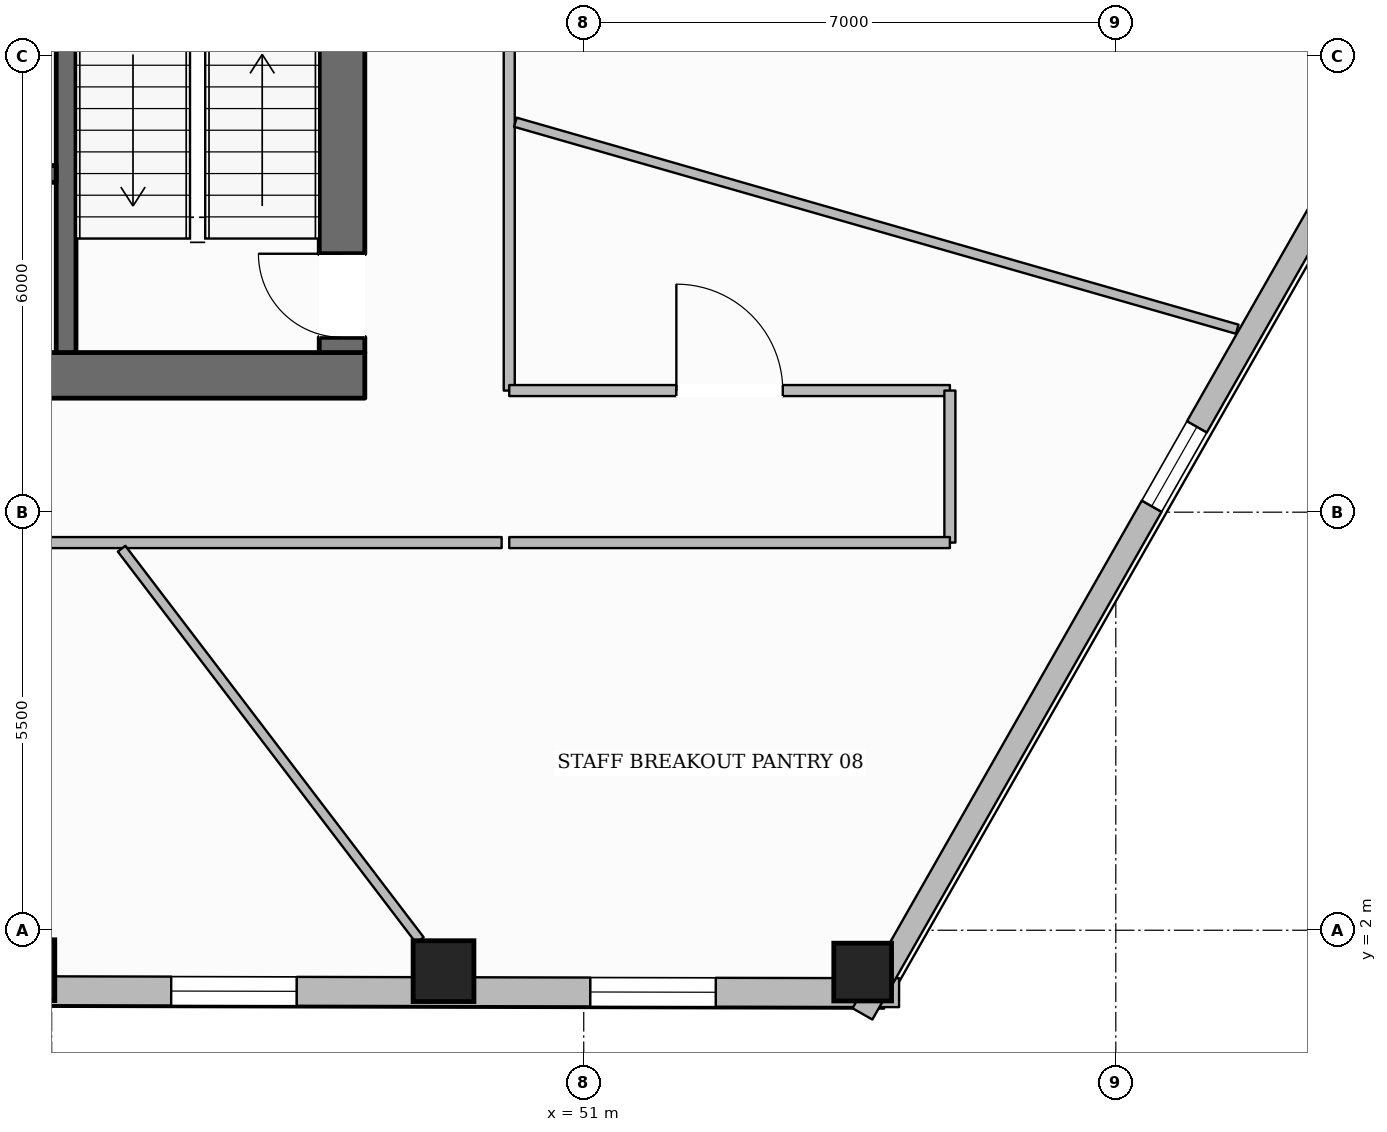
"""IFC4 building model, lengths in metres.
Left out: names, types, materials, properties, quantities, classifications, styles, units other than length and angle.
Written with IfcOpenShell. Run it as: python <this file> out.ifc"""

import sys

from ifc_helpers import new_model, si_unit, direction, frame, frame_2d, origin, origin_2d, place, context, subcontext, project, spatial, rectangle, hollow_rectangle, extrude, element, fill, save


model = new_model("IFC4")
c1 = context("Model", 3, precision=1e-05, world=origin(), true_north=direction((0.0, 1.0)))
c2 = subcontext(c1, "Body", "Model", "MODEL_VIEW")
j1 = project(units=[si_unit("LENGTHUNIT", "METRE"), si_unit("PLANEANGLEUNIT", "RADIAN")], contexts=[c1])
p1 = place(None, origin())
s1 = spatial("IfcSite", under=j1, at=p1, CompositionType="ELEMENT")
p2 = place(p1, origin())
s2 = spatial("IfcBuilding", under=s1, at=p2, CompositionType="ELEMENT")
p3 = place(p2, frame((0.0, 0.0, 32.95)))
s3 = spatial("IfcBuildingStorey", under=s2, at=p3, CompositionType="ELEMENT", Elevation=32.95)
p4 = place(p3, frame((27.88, 9.3, 0.0), z_axis=(0.0, 0.0, 1.0), x_axis=(1.0, 0.0, 0.0)))
e1 = element("IfcWall", 1, at=p4, inside=s3, PredefinedType="SOLIDWALL", context=c2, shape_type="SweptSolid", body=[
    extrude(rectangle(XDim=20.24, YDim=0.6, at=frame_2d((10.12, 0.0))), origin(), (0.0, 0.0, 1.0), 3.59),
])
p5 = place(p4, frame((10.62, 0.0, 0.0)))
e2 = element("IfcOpeningElement", 2, at=p5, cuts=e1, PredefinedType="OPENING", context=c2, shape_type="SweptSolid", body=[
    extrude(rectangle(XDim=1.4, YDim=2.2, at=frame_2d((0.7, 1.1))), frame((0.0, 0.31, 0.0), z_axis=(0.0, -1.0, 0.0), x_axis=(1.0, 0.0, 0.0)), (0.0, 0.0, 1.0), 0.62),
])
p6 = place(p3, frame((47.82, 9.6, 0.0), z_axis=(0.0, 0.0, 1.0), x_axis=(0.0, 1.0, 0.0)))
e3 = element("IfcWall", 3, at=p6, inside=s3, PredefinedType="SOLIDWALL", context=c2, shape_type="SweptSolid", body=[
    extrude(rectangle(XDim=13.0, YDim=0.6, at=frame_2d((6.5, 0.0))), origin(), (0.0, 0.0, 1.0), 3.59),
])
p7 = place(p6, frame((0.2, 0.0, 0.0)))
e4 = element("IfcOpeningElement", 4, at=p7, cuts=e3, PredefinedType="OPENING", context=c2, shape_type="SweptSolid", body=[
    extrude(rectangle(XDim=1.1, YDim=2.15, at=frame_2d((0.55, 1.075))), frame((0.0, 0.31, 0.0), z_axis=(0.0, -1.0, 0.0), x_axis=(1.0, 0.0, 0.0)), (0.0, 0.0, 1.0), 0.62),
])
p8 = place(p6, frame((8.4, 0.0, 0.0)))
e5 = element("IfcOpeningElement", 5, at=p8, cuts=e3, PredefinedType="OPENING", context=c2, shape_type="SweptSolid", body=[
    extrude(rectangle(XDim=0.9, YDim=2.1, at=frame_2d((0.45, 1.05))), frame((0.0, 0.31, 0.0), z_axis=(0.0, -1.0, 0.0), x_axis=(1.0, 0.0, 0.0)), (0.0, 0.0, 1.0), 0.62),
])
p9 = place(p3, frame((44.19, 9.6, 0.0), z_axis=(0.0, 0.0, 1.0), x_axis=(0.0, 1.0, 0.0)))
e6 = element("IfcWall", 6, at=p9, inside=s3, PredefinedType="SHEAR", context=c2, shape_type="SweptSolid", body=[
    extrude(rectangle(XDim=13.0, YDim=0.26, at=frame_2d((6.5, 0.0))), origin(), (0.0, 0.0, 1.0), 3.59),
])
p10 = place(p9, frame((10.925, 0.0, 0.0)))
e7 = element("IfcOpeningElement", 7, at=p10, cuts=e6, PredefinedType="OPENING", context=c2, shape_type="SweptSolid", body=[
    extrude(rectangle(XDim=1.25, YDim=2.25, at=frame_2d((0.625, 1.125))), frame((0.0, 0.14, 0.0), z_axis=(0.0, -1.0, 0.0), x_axis=(1.0, 0.0, 0.0)), (0.0, 0.0, 1.0), 0.28),
])
p11 = place(p3, frame((40.28, 11.95, 0.0), z_axis=(0.0, 0.0, 1.0), x_axis=(1.0, 0.0, 0.0)))
e8 = element("IfcWall", 8, at=p11, inside=s3, PredefinedType="SOLIDWALL", context=c2, shape_type="SweptSolid", body=[
    extrude(rectangle(XDim=3.78, YDim=0.22, at=frame_2d((1.89, 0.0))), origin(), (0.0, 0.0, 1.0), 3.59),
])
p12 = place(p11, frame((1.55, 0.0, 0.0)))
e9 = element("IfcOpeningElement", 9, at=p12, cuts=e8, PredefinedType="OPENING", context=c2, shape_type="SweptSolid", body=[
    extrude(rectangle(XDim=0.9, YDim=2.1, at=frame_2d((0.45, 1.05))), frame((0.0, 0.12, 0.0), z_axis=(0.0, -1.0, 0.0), x_axis=(1.0, 0.0, 0.0)), (0.0, 0.0, 1.0), 0.24),
])
for number, where, z_axis, x_axis in (
    (10, (43.641, 1.474, 0.0), (0.0, 0.0, 1.0), (1.0, 0.0, 0.0)),
    (11, (49.155, 1.462, 0.0), (0.0, 0.0, 1.0), (1.0, 0.0, 0.0)),
):
    element("IfcColumn", number, at=place(p3, frame(where, z_axis=z_axis, x_axis=x_axis)), inside=s3, PredefinedType="COLUMN", context=c2, shape_type="SweptSolid", body=[
        extrude(hollow_rectangle(XDim=0.8, YDim=0.8, WallThickness=0.036, at=origin_2d()), origin(), (0.0, 0.0, 1.0), 3.59),
    ])
p13 = place(p3, frame((54.67, 1.45, 0.0), z_axis=(0.0, 0.0, 1.0), x_axis=(1.0, 0.0, 0.0)))
e12 = element("IfcColumn", 12, at=p13, inside=s3, PredefinedType="COLUMN", context=c2, shape_type="SweptSolid", body=[
    extrude(hollow_rectangle(XDim=0.76, YDim=0.76, WallThickness=0.035, at=origin_2d()), origin(), (0.0, 0.0, 1.0), 3.59),
])
p14 = place(p3, frame((55.149, 1.179, 0.0), z_axis=(0.0, 0.0, 1.0), x_axis=(-0.999997528713, 0.002223188878, 0.0)))
e13 = element("IfcWall", 13, at=p14, inside=s3, PredefinedType="STANDARD", context=c2, shape_type="SweptSolid", body=[
    extrude(rectangle(XDim=34.043, YDim=0.38, at=frame_2d((17.021, 0.0))), origin(), (0.0, 0.0, 1.0), 2.97),
])
p15 = place(p14, frame((29.983, 0.0, 0.65)))
e14 = element("IfcOpeningElement", 14, at=p15, cuts=e13, PredefinedType="OPENING", context=c2, shape_type="SweptSolid", body=[
    extrude(rectangle(XDim=1.65, YDim=1.75, at=frame_2d((0.825, 0.875))), frame((0.0, 0.2, 0.0), z_axis=(0.0, -1.0, 0.0), x_axis=(1.0, 0.0, 0.0)), (0.0, 0.0, 1.0), 0.4),
])
p16 = place(p14, frame((24.469, 0.0, 0.65)))
e15 = element("IfcOpeningElement", 15, at=p16, cuts=e13, PredefinedType="OPENING", context=c2, shape_type="SweptSolid", body=[
    extrude(rectangle(XDim=1.65, YDim=1.75, at=frame_2d((0.825, 0.875))), frame((0.0, 0.2, 0.0), z_axis=(0.0, -1.0, 0.0), x_axis=(1.0, 0.0, 0.0)), (0.0, 0.0, 1.0), 0.4),
])
p17 = place(p14, frame((18.955, 0.0, 0.65)))
e16 = element("IfcOpeningElement", 16, at=p17, cuts=e13, PredefinedType="OPENING", context=c2, shape_type="SweptSolid", body=[
    extrude(rectangle(XDim=1.65, YDim=1.75, at=frame_2d((0.825, 0.875))), frame((0.0, 0.2, 0.0), z_axis=(0.0, -1.0, 0.0), x_axis=(1.0, 0.0, 0.0)), (0.0, 0.0, 1.0), 0.4),
])
p18 = place(p14, frame((7.926, 0.0, 0.65)))
e17 = element("IfcOpeningElement", 17, at=p18, cuts=e13, PredefinedType="OPENING", context=c2, shape_type="SweptSolid", body=[
    extrude(rectangle(XDim=1.65, YDim=1.75, at=frame_2d((0.825, 0.875))), frame((0.0, 0.2, 0.0), z_axis=(0.0, -1.0, 0.0), x_axis=(1.0, 0.0, 0.0)), (0.0, 0.0, 1.0), 0.4),
])
p19 = place(p14, frame((2.412, 0.0, 0.65)))
e18 = element("IfcOpeningElement", 18, at=p19, cuts=e13, PredefinedType="OPENING", context=c2, shape_type="SweptSolid", body=[
    extrude(rectangle(XDim=1.65, YDim=1.75, at=frame_2d((0.825, 0.875))), frame((0.0, 0.2, 0.0), z_axis=(0.0, -1.0, 0.0), x_axis=(1.0, 0.0, 0.0)), (0.0, 0.0, 1.0), 0.4),
])
p20 = place(p3, frame((62.872, 15.301, 0.0), z_axis=(0.0, 0.0, 1.0), x_axis=(-0.495028156912, -0.868876932519, 0.0)))
e19 = element("IfcWall", 19, at=p20, inside=s3, PredefinedType="STANDARD", context=c2, shape_type="SweptSolid", body=[
    extrude(rectangle(XDim=16.575, YDim=0.3, at=frame_2d((8.288, 0.0))), origin(), (0.0, 0.0, 1.0), 2.97),
])
p21 = place(p20, frame((7.688, 0.0, 0.65)))
e20 = element("IfcOpeningElement", 20, at=p21, cuts=e19, PredefinedType="OPENING", context=c2, shape_type="SweptSolid", body=[
    extrude(rectangle(XDim=1.2, YDim=1.7, at=frame_2d((0.6, 0.85))), frame((0.0, 0.16, 0.0), z_axis=(0.0, -1.0, 0.0), x_axis=(1.0, 0.0, 0.0)), (0.0, 0.0, 1.0), 0.32),
])
p22 = place(p3, frame((50.02, 25.1, 0.0), z_axis=(0.0, 0.0, 1.0), x_axis=(0.0, -1.0, 0.0)))
e21 = element("IfcWall", 21, at=p22, inside=s3, PredefinedType="PARTITIONING", context=c2, shape_type="SweptSolid", body=[
    extrude(rectangle(XDim=16.0, YDim=0.145, at=frame_2d((8.0, 0.0))), origin(), (0.0, 0.0, 1.0), 3.278),
])
p23 = place(p22, frame((2.834, 0.0, 0.0)))
e22 = element("IfcOpeningElement", 22, at=p23, cuts=e21, PredefinedType="OPENING", context=c2, shape_type="SweptSolid", body=[
    extrude(rectangle(XDim=1.4, YDim=2.2, at=frame_2d((0.7, 1.1))), frame((0.0, 0.083, 0.0), z_axis=(0.0, -1.0, 0.0), x_axis=(1.0, 0.0, 0.0)), (0.0, 0.0, 1.0), 0.165),
])
p24 = place(p22, frame((8.983, 0.0, 0.0)))
e23 = element("IfcOpeningElement", 23, at=p24, cuts=e21, PredefinedType="OPENING", context=c2, shape_type="SweptSolid", body=[
    extrude(rectangle(XDim=1.4, YDim=2.2, at=frame_2d((0.7, 1.1))), frame((0.0, 0.083, 0.0), z_axis=(0.0, -1.0, 0.0), x_axis=(1.0, 0.0, 0.0)), (0.0, 0.0, 1.0), 0.165),
])
p25 = place(p3, frame((50.02, 9.1, 0.0), z_axis=(0.0, 0.0, 1.0), x_axis=(1.0, 0.0, 0.0)))
e24 = element("IfcWall", 24, at=p25, inside=s3, PredefinedType="PARTITIONING", context=c2, shape_type="SweptSolid", body=[
    extrude(rectangle(XDim=5.797, YDim=0.145, at=frame_2d((2.898, 0.0))), origin(), (0.0, 0.0, 1.0), 3.59),
])
p26 = place(p25, frame((2.198, 0.0, 0.0)))
e25 = element("IfcOpeningElement", 25, at=p26, cuts=e24, PredefinedType="OPENING", context=c2, shape_type="SweptSolid", body=[
    extrude(rectangle(XDim=1.4, YDim=2.2, at=frame_2d((0.7, 1.1))), frame((0.0, 0.083, 0.0), z_axis=(0.0, -1.0, 0.0), x_axis=(1.0, 0.0, 0.0)), (0.0, 0.0, 1.0), 0.165),
])
p27 = place(p3, frame((55.817, 9.1, 0.0), z_axis=(0.0, 0.0, 1.0), x_axis=(0.0, -1.0, 0.0)))
e26 = element("IfcWall", 26, at=p27, inside=s3, PredefinedType="PARTITIONING", context=c2, shape_type="SweptSolid", body=[
    extrude(rectangle(XDim=2.0, YDim=0.145, at=frame_2d((1.0, 0.0))), origin(), (0.0, 0.0, 1.0), 3.59),
])
p28 = place(p3, frame((55.817, 7.1, 0.0), z_axis=(0.0, 0.0, 1.0), x_axis=(-1.0, 0.0, 0.0)))
e27 = element("IfcWall", 27, at=p28, inside=s3, PredefinedType="PARTITIONING", context=c2, shape_type="SweptSolid", body=[
    extrude(rectangle(XDim=5.797, YDim=0.145, at=frame_2d((2.898, 0.0))), origin(), (0.0, 0.0, 1.0), 3.59),
])
p29 = place(p3, frame((49.92, 7.1, 0.0), z_axis=(0.0, 0.0, 1.0), x_axis=(-1.0, 0.0, 0.0)))
e28 = element("IfcWall", 28, at=p29, inside=s3, PredefinedType="PARTITIONING", context=c2, shape_type="SweptSolid", body=[
    extrude(rectangle(XDim=23.84, YDim=0.145, at=frame_2d((11.92, 0.0))), origin(), (0.0, 0.0, 1.0), 3.278),
])
p30 = place(p29, frame((11.154, 0.0, 0.0)))
e29 = element("IfcOpeningElement", 29, at=p30, cuts=e28, PredefinedType="OPENING", context=c2, shape_type="SweptSolid", body=[
    extrude(rectangle(XDim=1.4, YDim=2.2, at=frame_2d((0.7, 1.1))), frame((0.0, 0.083, 0.0), z_axis=(0.0, -1.0, 0.0), x_axis=(1.0, 0.0, 0.0)), (0.0, 0.0, 1.0), 0.165),
])
p31 = place(p3, frame((44.92, 7.02, 0.0), z_axis=(0.0, 0.0, 1.0), x_axis=(0.606136374811, -0.795360732706, 0.0)))
e30 = element("IfcWall", 30, at=p31, inside=s3, PredefinedType="PARTITIONING", context=c2, shape_type="SweptSolid", body=[
    extrude(rectangle(XDim=6.474, YDim=0.125, at=frame_2d((3.237, 0.0))), origin(), (0.0, 0.0, 1.0), 3.59),
])
p32 = place(p3, frame((50.101, 12.63, 0.0), z_axis=(0.0, 0.0, 1.0), x_axis=(0.961255860269, -0.275657706401, 0.0)))
e31 = element("IfcWall", 31, at=p32, inside=s3, PredefinedType="PARTITIONING", context=c2, shape_type="SweptSolid", body=[
    extrude(rectangle(XDim=9.88, YDim=0.125, at=frame_2d((4.94, 0.0))), origin(), (0.0, 0.0, 1.0), 3.59),
])
p33 = place(p18, origin())
e32 = element("IfcWindow", 32, at=p33, inside=s3, PartitioningType="SINGLE_PANEL", PredefinedType="WINDOW", context=c2, shape_type="SweptSolid", body=[
    extrude(rectangle(XDim=1.65, YDim=1.75, at=frame_2d((0.825, 0.875))), frame((0.0, 0.03, 0.0), z_axis=(0.0, -1.0, 0.0), x_axis=(1.0, 0.0, 0.0)), (0.0, 0.0, 1.0), 0.06),
])
fill(e17, e32)
p34 = place(p19, origin())
e33 = element("IfcWindow", 33, at=p34, inside=s3, PartitioningType="SINGLE_PANEL", PredefinedType="WINDOW", context=c2, shape_type="SweptSolid", body=[
    extrude(rectangle(XDim=1.65, YDim=1.75, at=frame_2d((0.825, 0.875))), frame((0.0, 0.03, 0.0), z_axis=(0.0, -1.0, 0.0), x_axis=(1.0, 0.0, 0.0)), (0.0, 0.0, 1.0), 0.06),
])
fill(e18, e33)
p35 = place(p21, origin())
e34 = element("IfcWindow", 34, at=p35, inside=s3, PartitioningType="SINGLE_PANEL", PredefinedType="WINDOW", context=c2, shape_type="SweptSolid", body=[
    extrude(rectangle(XDim=1.2, YDim=1.7, at=frame_2d((0.6, 0.85))), frame((0.0, 0.03, 0.0), z_axis=(0.0, -1.0, 0.0), x_axis=(1.0, 0.0, 0.0)), (0.0, 0.0, 1.0), 0.06),
])
fill(e20, e34)
p36 = place(p7, origin())
e35 = element("IfcDoor", 35, at=p36, inside=s3, OperationType="SINGLE_SWING_RIGHT", PredefinedType="DOOR", context=c2, shape_type="SweptSolid", body=[
    extrude(rectangle(XDim=1.1, YDim=2.15, at=frame_2d((0.55, 1.075))), frame((0.0, 0.025, 0.0), z_axis=(0.0, -1.0, 0.0), x_axis=(1.0, 0.0, 0.0)), (0.0, 0.0, 1.0), 0.05),
])
fill(e4, e35)
p37 = place(p26, origin())
e36 = element("IfcDoor", 36, at=p37, inside=s3, OperationType="SINGLE_SWING_LEFT", PredefinedType="DOOR", context=c2, shape_type="SweptSolid", body=[
    extrude(rectangle(XDim=1.4, YDim=2.2, at=frame_2d((0.7, 1.1))), frame((0.0, 0.025, 0.0), z_axis=(0.0, -1.0, 0.0), x_axis=(1.0, 0.0, 0.0)), (0.0, 0.0, 1.0), 0.05),
])
fill(e25, e36)
save(model, sys.argv[1])
